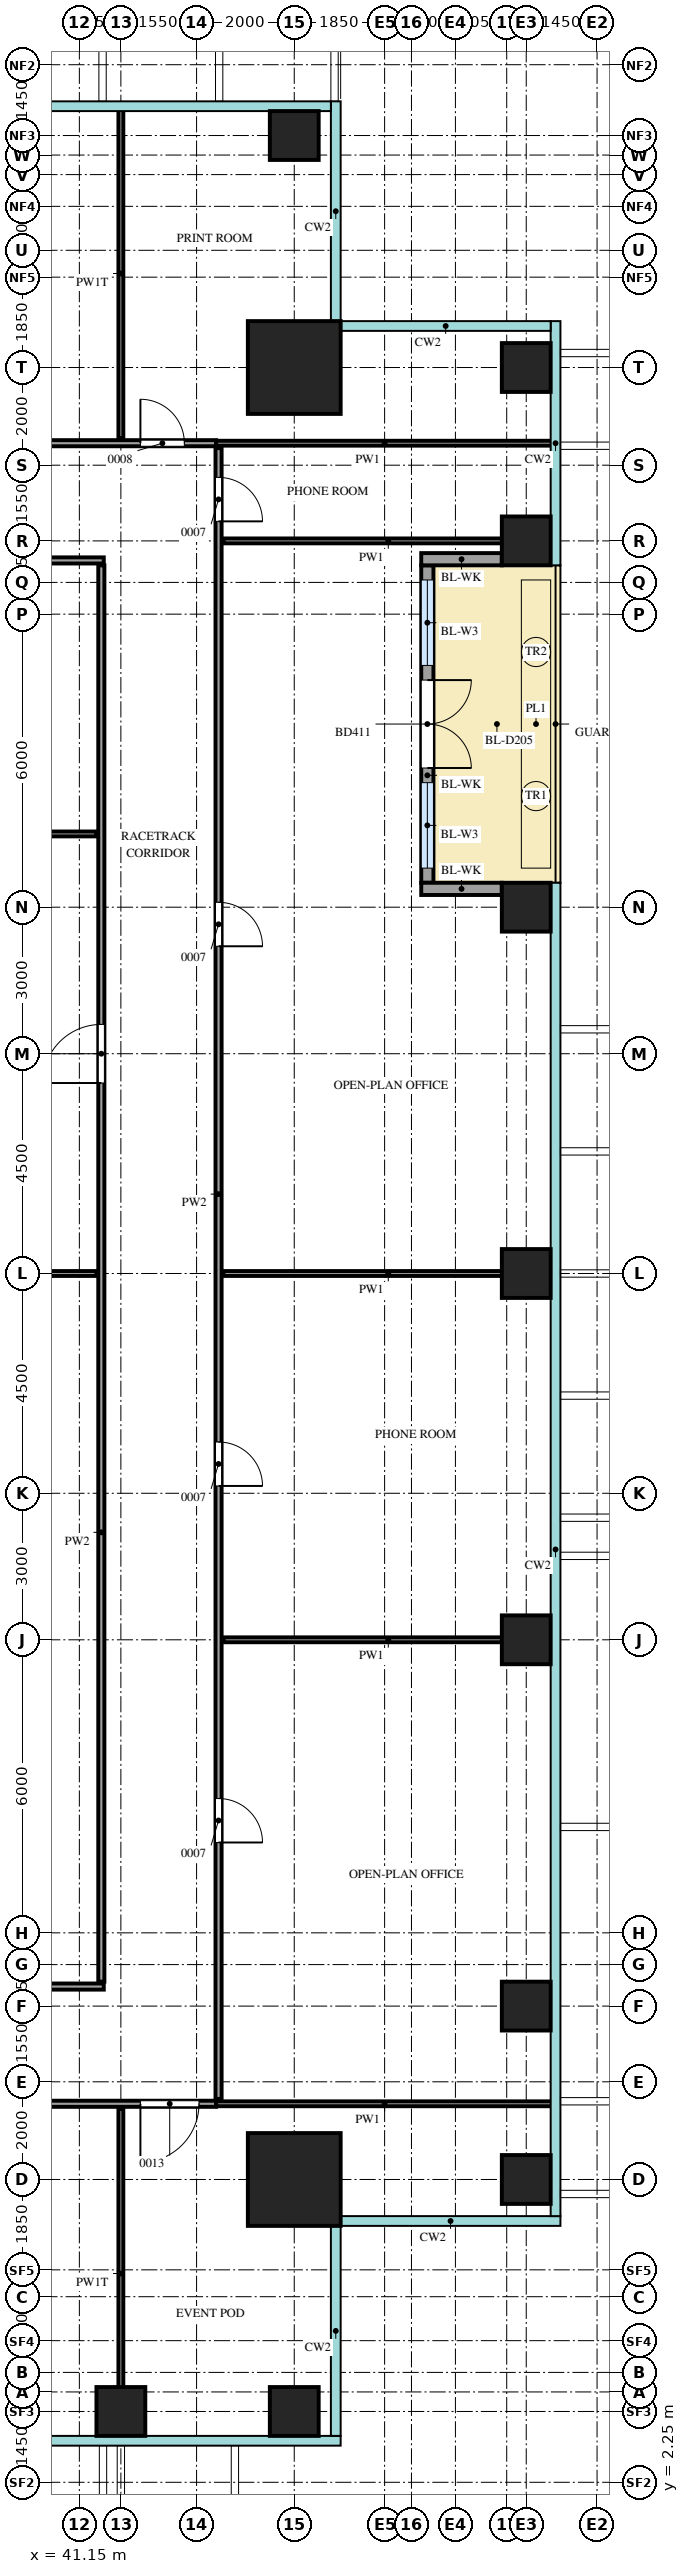
"""IFC4 building model, lengths in metres.
Left out: names, types, materials, properties, quantities, classifications, styles, units other than length and angle.
Written with IfcOpenShell. Run it as: python <this file> out.ifc"""

import sys

from ifc_helpers import new_model, si_unit, direction, frame, frame_2d, origin, origin_2d, place, context, subcontext, project, spatial, rectangle, extrude, source, transform, mapped, element, fill, save


model = new_model("IFC4")
c1 = context("Model", 3, precision=1e-05, world=origin(), true_north=direction((0.0, 1.0)))
c2 = subcontext(c1, "Body", "Model", "MODEL_VIEW")
j1 = project(units=[si_unit("LENGTHUNIT", "METRE"), si_unit("PLANEANGLEUNIT", "RADIAN")], contexts=[c1])
p1 = place(None, origin())
s1 = spatial("IfcSite", under=j1, at=p1, CompositionType="ELEMENT")
p2 = place(p1, origin())
s2 = spatial("IfcBuilding", under=s1, at=p2, CompositionType="ELEMENT")
p3 = place(p2, frame((0.0, 0.0, 188.7)))
s3 = spatial("IfcBuildingStorey", under=s2, at=p3, CompositionType="ELEMENT", Elevation=188.7)
m1 = source(origin(), c2, "Body", "SweptSolid", [
    extrude(rectangle(XDim=1.9, YDim=1.9, at=origin_2d()), origin(), (0.0, 0.0, 1.0), 4.0),
])
for number, where, z_axis, x_axis in (
    (1, (45.55, 45.55, 0.0), (0.0, 0.0, 1.0), (1.0, 0.0, 0.0)),
    (2, (45.55, 8.45, 0.0), (0.0, 0.0, 1.0), (1.0, 0.0, 0.0)),
):
    element("IfcColumn", number, at=place(p3, frame(where, z_axis=z_axis, x_axis=x_axis)), inside=s3, PredefinedType="COLUMN", context=c2, shape_type="MappedRepresentation", body=[
        mapped(m1, transform((0.0, 0.0, 0.0))),
    ])
m2 = source(origin(), c2, "Body", "SweptSolid", [
    extrude(rectangle(XDim=1.0, YDim=1.0, at=origin_2d()), origin(), (0.0, 0.0, 1.0), 3.75),
])
for number, where, z_axis, x_axis in (
    (3, (42.0, 3.7, 0.0), (0.0, 0.0, 1.0), (1.0, 0.0, 0.0)),
    (4, (45.55, 3.7, 0.0), (0.0, 0.0, 1.0), (1.0, 0.0, 0.0)),
    (5, (50.3, 8.45, 0.0), (0.0, 0.0, 1.0), (1.0, 0.0, 0.0)),
    (6, (50.3, 12.0, 0.0), (0.0, 0.0, 1.0), (1.0, 0.0, 0.0)),
    (7, (50.3, 19.5, 0.0), (0.0, 0.0, 1.0), (1.0, 0.0, 0.0)),
    (8, (50.3, 27.0, 0.0), (0.0, 0.0, 1.0), (1.0, 0.0, 0.0)),
    (9, (50.3, 34.5, 0.0), (0.0, 0.0, 1.0), (1.0, 0.0, 0.0)),
    (10, (50.3, 42.0, 0.0), (0.0, 0.0, 1.0), (1.0, 0.0, 0.0)),
    (11, (50.3, 45.55, 0.0), (0.0, 0.0, 1.0), (1.0, 0.0, 0.0)),
    (12, (45.55, 50.3, 0.0), (0.0, 0.0, 1.0), (1.0, 0.0, 0.0)),
):
    element("IfcColumn", number, at=place(p3, frame(where, z_axis=z_axis, x_axis=x_axis)), inside=s3, PredefinedType="COLUMN", context=c2, shape_type="MappedRepresentation", body=[
        mapped(m2, transform((0.0, 0.0, 0.0))),
    ])
m3 = source(origin(), c2, "Body", "SweptSolid", [
    extrude(rectangle(XDim=6.5, YDim=0.25, at=frame_2d((3.25, 0.0))), origin(), (0.0, 0.0, 1.0), 3.15),
])
p4 = place(p3, frame((48.275, 35.0, 0.0), z_axis=(0.0, 0.0, 1.0), x_axis=(0.0, 1.0, 0.0)))
e13 = element("IfcWall", 13, at=p4, inside=s3, PredefinedType="SOLIDWALL", context=c2, shape_type="MappedRepresentation", body=[
    mapped(m3, transform((0.0, 0.0, 0.0))),
])
m4 = source(origin(), c2, "Body", "SweptSolid", [
    extrude(rectangle(XDim=1.75, YDim=2.4, at=frame_2d((0.875, 1.2))), frame((0.0, 0.135, 0.0), z_axis=(0.0, -1.0, 0.0), x_axis=(1.0, 0.0, 0.0)), (0.0, 0.0, 1.0), 0.27),
])
p5 = place(p4, frame((0.3, 0.0, 0.0)))
e14 = element("IfcOpeningElement", 14, at=p5, cuts=e13, PredefinedType="OPENING", context=c2, shape_type="MappedRepresentation", body=[
    mapped(m4, transform((0.0, 0.0, 0.0))),
])
p6 = place(p4, frame((4.45, 0.0, 0.0)))
e15 = element("IfcOpeningElement", 15, at=p6, cuts=e13, PredefinedType="OPENING", context=c2, shape_type="MappedRepresentation", body=[
    mapped(m4, transform((0.0, 0.0, 0.0))),
])
m5 = source(origin(), c2, "Body", "SweptSolid", [
    extrude(rectangle(XDim=1.8, YDim=2.4, at=frame_2d((0.9, 1.2))), frame((0.0, 0.135, 0.0), z_axis=(0.0, -1.0, 0.0), x_axis=(1.0, 0.0, 0.0)), (0.0, 0.0, 1.0), 0.27),
])
p7 = place(p4, frame((2.35, 0.0, 0.0)))
e16 = element("IfcOpeningElement", 16, at=p7, cuts=e13, PredefinedType="OPENING", context=c2, shape_type="MappedRepresentation", body=[
    mapped(m5, transform((0.0, 0.0, 0.0))),
])
m6 = source(origin(), c2, "Body", "SweptSolid", [
    extrude(rectangle(XDim=1.65, YDim=0.25, at=frame_2d((0.825, 0.0))), origin(), (0.0, 0.0, 1.0), 3.15),
])
for number, where, z_axis, x_axis in (
    (17, (49.8, 34.875, 0.0), (0.0, 0.0, 1.0), (-1.0, 0.0, 0.0)),
    (18, (49.8, 41.625, 0.0), (0.0, 0.0, 1.0), (-1.0, 0.0, 0.0)),
):
    element("IfcWall", number, at=place(p3, frame(where, z_axis=z_axis, x_axis=x_axis)), inside=s3, PredefinedType="SOLIDWALL", context=c2, shape_type="MappedRepresentation", body=[
        mapped(m6, transform((0.0, 0.0, 0.0))),
    ])
m7 = source(origin(), c2, "Body", "SweptSolid", [
    extrude(rectangle(XDim=6.75, YDim=0.1, at=frame_2d((3.375, 0.0))), origin(), (0.0, 0.0, 1.0), 3.3),
])
p8 = place(p3, frame((42.0, 3.15, 0.0), z_axis=(0.0, 0.0, 1.0), x_axis=(0.0, 1.0, 0.0)))
e19 = element("IfcWall", 19, at=p8, inside=s3, PredefinedType="PARTITIONING", context=c2, shape_type="MappedRepresentation", body=[
    mapped(m7, transform((0.0, 0.0, 0.0))),
])
m8 = source(origin(), c2, "Body", "SweptSolid", [
    extrude(rectangle(XDim=20.6, YDim=0.125, at=frame_2d((10.3, 0.0))), origin(), (0.0, 0.0, 1.0), 3.8),
])
p9 = place(p3, frame((23.35, 10.0, 0.0), z_axis=(0.0, 0.0, 1.0), x_axis=(1.0, 0.0, 0.0)))
e20 = element("IfcWall", 20, at=p9, inside=s3, PredefinedType="PARTITIONING", context=c2, shape_type="MappedRepresentation", body=[
    mapped(m8, transform((0.0, 0.0, 0.0))),
])
m9 = source(origin(), c2, "Body", "SweptSolid", [
    extrude(rectangle(XDim=0.9, YDim=2.1, at=frame_2d((0.45, 1.05))), frame((0.0, 0.073, 0.0), z_axis=(0.0, -1.0, 0.0), x_axis=(1.0, 0.0, 0.0)), (0.0, 0.0, 1.0), 0.145),
])
p10 = place(p9, frame((1.25, 0.0, 0.0)))
e21 = element("IfcOpeningElement", 21, at=p10, cuts=e20, PredefinedType="OPENING", context=c2, shape_type="MappedRepresentation", body=[
    mapped(m9, transform((0.0, 0.0, 0.0))),
])
m10 = source(origin(), c2, "Body", "SweptSolid", [
    extrude(rectangle(XDim=1.2, YDim=2.1, at=frame_2d((0.6, 1.05))), frame((0.0, 0.073, 0.0), z_axis=(0.0, -1.0, 0.0), x_axis=(1.0, 0.0, 0.0)), (0.0, 0.0, 1.0), 0.145),
])
p11 = place(p9, frame((10.55, 0.0, 0.0)))
e22 = element("IfcOpeningElement", 22, at=p11, cuts=e20, PredefinedType="OPENING", context=c2, shape_type="MappedRepresentation", body=[
    mapped(m10, transform((0.0, 0.0, 0.0))),
])
p12 = place(p9, frame((19.05, 0.0, 0.0)))
e23 = element("IfcOpeningElement", 23, at=p12, cuts=e20, PredefinedType="OPENING", context=c2, shape_type="MappedRepresentation", body=[
    mapped(m10, transform((0.0, 0.0, 0.0))),
])
m11 = source(origin(), c2, "Body", "SweptSolid", [
    extrude(rectangle(XDim=6.9, YDim=0.1, at=frame_2d((3.45, 0.0))), origin(), (0.0, 0.0, 1.0), 3.8),
])
p13 = place(p3, frame((43.95, 10.0, 0.0), z_axis=(0.0, 0.0, 1.0), x_axis=(1.0, 0.0, 0.0)))
e24 = element("IfcWall", 24, at=p13, inside=s3, PredefinedType="PARTITIONING", context=c2, shape_type="MappedRepresentation", body=[
    mapped(m11, transform((0.0, 0.0, 0.0))),
])
m12 = source(origin(), c2, "Body", "SweptSolid", [
    extrude(rectangle(XDim=33.8, YDim=0.125, at=frame_2d((16.9, 0.0))), origin(), (0.0, 0.0, 1.0), 3.8),
])
p14 = place(p3, frame((44.0, 10.1, 0.0), z_axis=(0.0, 0.0, 1.0), x_axis=(0.0, 1.0, 0.0)))
e25 = element("IfcWall", 25, at=p14, inside=s3, PredefinedType="PARTITIONING", context=c2, shape_type="MappedRepresentation", body=[
    mapped(m12, transform((0.0, 0.0, 0.0))),
])
p15 = place(p14, frame((5.25, 0.0, 0.0)))
e26 = element("IfcOpeningElement", 26, at=p15, cuts=e25, PredefinedType="OPENING", context=c2, shape_type="MappedRepresentation", body=[
    mapped(m9, transform((0.0, 0.0, 0.0))),
])
p16 = place(p14, frame((12.55, 0.0, 0.0)))
e27 = element("IfcOpeningElement", 27, at=p16, cuts=e25, PredefinedType="OPENING", context=c2, shape_type="MappedRepresentation", body=[
    mapped(m9, transform((0.0, 0.0, 0.0))),
])
p17 = place(p14, frame((23.6, 0.0, 0.0)))
e28 = element("IfcOpeningElement", 28, at=p17, cuts=e25, PredefinedType="OPENING", context=c2, shape_type="MappedRepresentation", body=[
    mapped(m9, transform((0.0, 0.0, 0.0))),
])
p18 = place(p14, frame((32.3, 0.0, 0.0)))
e29 = element("IfcOpeningElement", 29, at=p18, cuts=e25, PredefinedType="OPENING", context=c2, shape_type="MappedRepresentation", body=[
    mapped(m9, transform((0.0, 0.0, 0.0))),
])
m13 = source(origin(), c2, "Body", "SweptSolid", [
    extrude(rectangle(XDim=18.3, YDim=0.125, at=frame_2d((9.15, 0.0))), origin(), (0.0, 0.0, 1.0), 3.8),
])
p19 = place(p3, frame((23.35, 12.4, 0.0), z_axis=(0.0, 0.0, 1.0), x_axis=(1.0, 0.0, 0.0)))
e30 = element("IfcWall", 30, at=p19, inside=s3, PredefinedType="PARTITIONING", context=c2, shape_type="MappedRepresentation", body=[
    mapped(m13, transform((0.0, 0.0, 0.0))),
])
m14 = source(origin(), c2, "Body", "SweptSolid", [
    extrude(rectangle(XDim=29.0, YDim=0.125, at=frame_2d((14.5, 0.0))), origin(), (0.0, 0.0, 1.0), 3.8),
])
p20 = place(p3, frame((41.6, 12.5, 0.0), z_axis=(0.0, 0.0, 1.0), x_axis=(0.0, 1.0, 0.0)))
e31 = element("IfcWall", 31, at=p20, inside=s3, PredefinedType="PARTITIONING", context=c2, shape_type="MappedRepresentation", body=[
    mapped(m14, transform((0.0, 0.0, 0.0))),
])
p21 = place(p20, frame((18.4, 0.0, 0.0)))
e32 = element("IfcOpeningElement", 32, at=p21, cuts=e31, PredefinedType="OPENING", context=c2, shape_type="MappedRepresentation", body=[
    mapped(m10, transform((0.0, 0.0, 0.0))),
])
m15 = source(origin(), c2, "Body", "SweptSolid", [
    extrude(rectangle(XDim=6.75, YDim=0.1, at=frame_2d((3.375, 0.0))), origin(), (0.0, 0.0, 1.0), 3.8),
])
p22 = place(p3, frame((44.1, 19.5, 0.0), z_axis=(0.0, 0.0, 1.0), x_axis=(1.0, 0.0, 0.0)))
e33 = element("IfcWall", 33, at=p22, inside=s3, PredefinedType="PARTITIONING", context=c2, shape_type="MappedRepresentation", body=[
    mapped(m15, transform((0.0, 0.0, 0.0))),
])
m16 = source(origin(), c2, "Body", "SweptSolid", [
    extrude(rectangle(XDim=18.0, YDim=0.1, at=frame_2d((9.0, 0.0))), origin(), (0.0, 0.0, 1.0), 3.8),
])
p23 = place(p3, frame((23.5, 27.0, 0.0), z_axis=(0.0, 0.0, 1.0), x_axis=(1.0, 0.0, 0.0)))
e34 = element("IfcWall", 34, at=p23, inside=s3, PredefinedType="PARTITIONING", context=c2, shape_type="MappedRepresentation", body=[
    mapped(m16, transform((0.0, 0.0, 0.0))),
])
p24 = place(p3, frame((44.1, 27.0, 0.0), z_axis=(0.0, 0.0, 1.0), x_axis=(1.0, 0.0, 0.0)))
e35 = element("IfcWall", 35, at=p24, inside=s3, PredefinedType="PARTITIONING", context=c2, shape_type="MappedRepresentation", body=[
    mapped(m15, transform((0.0, 0.0, 0.0))),
])
m17 = source(origin(), c2, "Body", "SweptSolid", [
    extrude(rectangle(XDim=10.95, YDim=0.1, at=frame_2d((5.475, 0.0))), origin(), (0.0, 0.0, 1.0), 3.8),
])
p25 = place(p3, frame((30.55, 36.0, 0.0), z_axis=(0.0, 0.0, 1.0), x_axis=(1.0, 0.0, 0.0)))
e36 = element("IfcWall", 36, at=p25, inside=s3, PredefinedType="PARTITIONING", context=c2, shape_type="MappedRepresentation", body=[
    mapped(m17, transform((0.0, 0.0, 0.0))),
])
m18 = source(origin(), c2, "Body", "SweptSolid", [
    extrude(rectangle(XDim=11.1, YDim=0.125, at=frame_2d((5.55, 0.0))), origin(), (0.0, 0.0, 1.0), 3.8),
])
p26 = place(p3, frame((30.55, 41.6, 0.0), z_axis=(0.0, 0.0, 1.0), x_axis=(1.0, 0.0, 0.0)))
e37 = element("IfcWall", 37, at=p26, inside=s3, PredefinedType="PARTITIONING", context=c2, shape_type="MappedRepresentation", body=[
    mapped(m18, transform((0.0, 0.0, 0.0))),
])
p27 = place(p26, frame((5.25, 0.0, 0.0)))
e38 = element("IfcOpeningElement", 38, at=p27, cuts=e37, PredefinedType="OPENING", context=c2, shape_type="MappedRepresentation", body=[
    mapped(m9, transform((0.0, 0.0, 0.0))),
])
p28 = place(p3, frame((44.1, 42.0, 0.0), z_axis=(0.0, 0.0, 1.0), x_axis=(1.0, 0.0, 0.0)))
e39 = element("IfcWall", 39, at=p28, inside=s3, PredefinedType="PARTITIONING", context=c2, shape_type="MappedRepresentation", body=[
    mapped(m15, transform((0.0, 0.0, 0.0))),
])
m19 = source(origin(), c2, "Body", "SweptSolid", [
    extrude(rectangle(XDim=13.4, YDim=0.125, at=frame_2d((6.7, 0.0))), origin(), (0.0, 0.0, 1.0), 3.8),
])
p29 = place(p3, frame((30.55, 44.0, 0.0), z_axis=(0.0, 0.0, 1.0), x_axis=(1.0, 0.0, 0.0)))
e40 = element("IfcWall", 40, at=p29, inside=s3, PredefinedType="PARTITIONING", context=c2, shape_type="MappedRepresentation", body=[
    mapped(m19, transform((0.0, 0.0, 0.0))),
])
p30 = place(p29, frame((5.3, 0.0, 0.0)))
e41 = element("IfcOpeningElement", 41, at=p30, cuts=e40, PredefinedType="OPENING", context=c2, shape_type="MappedRepresentation", body=[
    mapped(m9, transform((0.0, 0.0, 0.0))),
])
p31 = place(p29, frame((11.85, 0.0, 0.0)))
e42 = element("IfcOpeningElement", 42, at=p31, cuts=e40, PredefinedType="OPENING", context=c2, shape_type="MappedRepresentation", body=[
    mapped(m9, transform((0.0, 0.0, 0.0))),
])
p32 = place(p3, frame((43.95, 44.0, 0.0), z_axis=(0.0, 0.0, 1.0), x_axis=(1.0, 0.0, 0.0)))
e43 = element("IfcWall", 43, at=p32, inside=s3, PredefinedType="PARTITIONING", context=c2, shape_type="MappedRepresentation", body=[
    mapped(m11, transform((0.0, 0.0, 0.0))),
])
p33 = place(p3, frame((42.0, 44.1, 0.0), z_axis=(0.0, 0.0, 1.0), x_axis=(0.0, 1.0, 0.0)))
e44 = element("IfcWall", 44, at=p33, inside=s3, PredefinedType="PARTITIONING", context=c2, shape_type="MappedRepresentation", body=[
    mapped(m7, transform((0.0, 0.0, 0.0))),
])
m20 = source(origin(), c2, "Body", "SweptSolid", [
    extrude(rectangle(XDim=1.75, YDim=2.4, at=frame_2d((0.875, 1.2))), frame((0.0, 0.03, 0.0), z_axis=(0.0, -1.0, 0.0), x_axis=(1.0, 0.0, 0.0)), (0.0, 0.0, 1.0), 0.06),
])
p34 = place(p5, origin())
e45 = element("IfcWindow", 45, at=p34, inside=s3, PartitioningType="SINGLE_PANEL", PredefinedType="WINDOW", context=c2, shape_type="MappedRepresentation", body=[
    mapped(m20, transform((0.0, 0.0, 0.0))),
])
fill(e14, e45)
p35 = place(p6, origin())
e46 = element("IfcWindow", 46, at=p35, inside=s3, PartitioningType="SINGLE_PANEL", PredefinedType="WINDOW", context=c2, shape_type="MappedRepresentation", body=[
    mapped(m20, transform((0.0, 0.0, 0.0))),
])
fill(e15, e46)
m21 = source(origin(), c2, "Body", "SweptSolid", [
    extrude(rectangle(XDim=1.8, YDim=2.4, at=frame_2d((0.9, 1.2))), frame((0.0, 0.025, 0.0), z_axis=(0.0, -1.0, 0.0), x_axis=(1.0, 0.0, 0.0)), (0.0, 0.0, 1.0), 0.05),
])
p36 = place(p7, origin())
e47 = element("IfcDoor", 47, at=p36, inside=s3, OperationType="DOUBLE_DOOR_DOUBLE_SWING", PredefinedType="DOOR", context=c2, shape_type="MappedRepresentation", body=[
    mapped(m21, transform((0.0, 0.0, 0.0))),
])
fill(e16, e47)
m22 = source(origin(), c2, "Body", "SweptSolid", [
    extrude(rectangle(XDim=1.2, YDim=2.1, at=frame_2d((0.6, 1.05))), frame((0.0, 0.025, 0.0), z_axis=(0.0, -1.0, 0.0), x_axis=(1.0, 0.0, 0.0)), (0.0, 0.0, 1.0), 0.05),
])
p37 = place(p12, origin())
e48 = element("IfcDoor", 48, at=p37, inside=s3, OperationType="SINGLE_SWING_LEFT", PredefinedType="DOOR", context=c2, shape_type="MappedRepresentation", body=[
    mapped(m22, transform((0.0, 0.0, 0.0))),
])
fill(e23, e48)
m23 = source(origin(), c2, "Body", "SweptSolid", [
    extrude(rectangle(XDim=0.9, YDim=2.1, at=frame_2d((0.45, 1.05))), frame((0.0, 0.025, 0.0), z_axis=(0.0, -1.0, 0.0), x_axis=(1.0, 0.0, 0.0)), (0.0, 0.0, 1.0), 0.05),
])
p38 = place(p15, origin())
e49 = element("IfcDoor", 49, at=p38, inside=s3, OperationType="SINGLE_SWING_LEFT", PredefinedType="DOOR", context=c2, shape_type="MappedRepresentation", body=[
    mapped(m23, transform((0.0, 0.0, 0.0))),
])
fill(e26, e49)
p39 = place(p16, origin())
e50 = element("IfcDoor", 50, at=p39, inside=s3, OperationType="SINGLE_SWING_LEFT", PredefinedType="DOOR", context=c2, shape_type="MappedRepresentation", body=[
    mapped(m23, transform((0.0, 0.0, 0.0))),
])
fill(e27, e50)
p40 = place(p17, origin())
e51 = element("IfcDoor", 51, at=p40, inside=s3, OperationType="SINGLE_SWING_LEFT", PredefinedType="DOOR", context=c2, shape_type="MappedRepresentation", body=[
    mapped(m23, transform((0.0, 0.0, 0.0))),
])
fill(e28, e51)
p41 = place(p18, origin())
e52 = element("IfcDoor", 52, at=p41, inside=s3, OperationType="SINGLE_SWING_LEFT", PredefinedType="DOOR", context=c2, shape_type="MappedRepresentation", body=[
    mapped(m23, transform((0.0, 0.0, 0.0))),
])
fill(e29, e52)
p42 = place(p31, origin())
e53 = element("IfcDoor", 53, at=p42, inside=s3, OperationType="SINGLE_SWING_RIGHT", PredefinedType="DOOR", context=c2, shape_type="MappedRepresentation", body=[
    mapped(m23, transform((0.0, 0.0, 0.0))),
])
fill(e42, e53)
p43 = place(p21, origin())
e54 = element("IfcDoor", 54, at=p43, inside=s3, OperationType="SINGLE_SWING_RIGHT", PredefinedType="DOOR", context=c2, shape_type="MappedRepresentation", body=[
    mapped(m22, transform((0.0, 0.0, 0.0))),
])
fill(e32, e54)
save(model, sys.argv[1])
